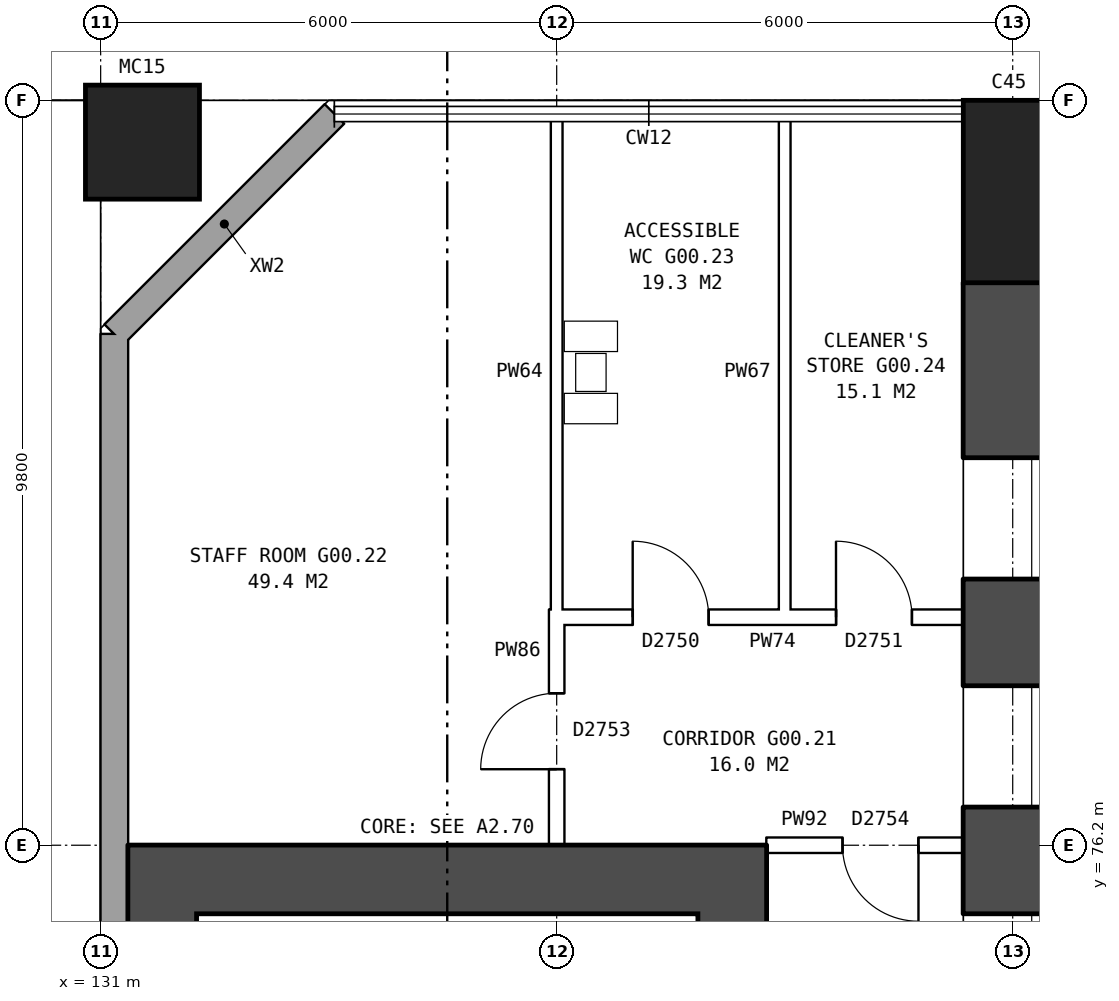
"""IFC4 building model, lengths in metres.
Left out: names, types, materials, properties, quantities, classifications, styles, units other than length and angle.
Written with IfcOpenShell. Run it as: python <this file> out.ifc"""

import sys

from ifc_helpers import new_model, si_unit, direction, frame, frame_2d, origin, origin_2d, place, context, subcontext, project, spatial, rectangle, hollow_rectangle, extrude, element, fill, save


model = new_model("IFC4")
c1 = context("Model", 3, precision=1e-05, world=origin(), true_north=direction((0.0, 1.0)))
c2 = subcontext(c1, "Body", "Model", "MODEL_VIEW")
j1 = project(units=[si_unit("LENGTHUNIT", "METRE"), si_unit("PLANEANGLEUNIT", "RADIAN")], contexts=[c1])
p1 = place(None, origin())
s1 = spatial("IfcSite", under=j1, at=p1, CompositionType="ELEMENT")
p2 = place(p1, origin())
s2 = spatial("IfcBuilding", under=s1, at=p2, CompositionType="ELEMENT")
p3 = place(p2, origin())
s3 = spatial("IfcBuildingStorey", under=s2, at=p3, CompositionType="ELEMENT", Elevation=0.0)
p4 = place(p3, frame((142.95, 84.8, -0.35), z_axis=(0.0, 0.0, 1.0), x_axis=(1.0, 0.0, 0.0)))
e1 = element("IfcColumn", 1, at=p4, inside=s3, PredefinedType="COLUMN", context=c2, shape_type="SweptSolid", body=[
    extrude(rectangle(XDim=1.2, YDim=2.4, at=origin_2d()), origin(), (0.0, 0.0, 1.0), 5.55),
])
p5 = place(p3, frame((142.95, 56.4, -0.35), z_axis=(0.0, 0.0, 1.0), x_axis=(0.0, 1.0, 0.0)))
e2 = element("IfcWall", 2, at=p5, inside=s3, PredefinedType="SHEAR", context=c2, shape_type="SweptSolid", body=[
    extrude(rectangle(XDim=27.2, YDim=1.2, at=frame_2d((13.6, 0.0))), origin(), (0.0, 0.0, 1.0), 5.55),
])
p6 = place(p5, frame((2.3, 0.0, 0.8)))
e3 = element("IfcOpeningElement", 3, at=p6, cuts=e2, PredefinedType="OPENING", context=c2, shape_type="SweptSolid", body=[
    extrude(rectangle(XDim=1.6, YDim=1.8, at=frame_2d((0.8, 0.9))), frame((0.0, 0.61, 0.0), z_axis=(0.0, -1.0, 0.0), x_axis=(1.0, 0.0, 0.0)), (0.0, 0.0, 1.0), 1.22),
])
p7 = place(p5, frame((5.3, 0.0, 0.8)))
e4 = element("IfcOpeningElement", 4, at=p7, cuts=e2, PredefinedType="OPENING", context=c2, shape_type="SweptSolid", body=[
    extrude(rectangle(XDim=1.6, YDim=1.8, at=frame_2d((0.8, 0.9))), frame((0.0, 0.61, 0.0), z_axis=(0.0, -1.0, 0.0), x_axis=(1.0, 0.0, 0.0)), (0.0, 0.0, 1.0), 1.22),
])
p8 = place(p5, frame((8.3, 0.0, 0.8)))
e5 = element("IfcOpeningElement", 5, at=p8, cuts=e2, PredefinedType="OPENING", context=c2, shape_type="SweptSolid", body=[
    extrude(rectangle(XDim=1.6, YDim=1.8, at=frame_2d((0.8, 0.9))), frame((0.0, 0.61, 0.0), z_axis=(0.0, -1.0, 0.0), x_axis=(1.0, 0.0, 0.0)), (0.0, 0.0, 1.0), 1.22),
])
p9 = place(p5, frame((11.3, 0.0, 0.8)))
e6 = element("IfcOpeningElement", 6, at=p9, cuts=e2, PredefinedType="OPENING", context=c2, shape_type="SweptSolid", body=[
    extrude(rectangle(XDim=1.6, YDim=1.8, at=frame_2d((0.8, 0.9))), frame((0.0, 0.61, 0.0), z_axis=(0.0, -1.0, 0.0), x_axis=(1.0, 0.0, 0.0)), (0.0, 0.0, 1.0), 1.22),
])
p10 = place(p5, frame((14.3, 0.0, 0.8)))
e7 = element("IfcOpeningElement", 7, at=p10, cuts=e2, PredefinedType="OPENING", context=c2, shape_type="SweptSolid", body=[
    extrude(rectangle(XDim=1.6, YDim=1.8, at=frame_2d((0.8, 0.9))), frame((0.0, 0.61, 0.0), z_axis=(0.0, -1.0, 0.0), x_axis=(1.0, 0.0, 0.0)), (0.0, 0.0, 1.0), 1.22),
])
p11 = place(p5, frame((17.3, 0.0, 0.8)))
e8 = element("IfcOpeningElement", 8, at=p11, cuts=e2, PredefinedType="OPENING", context=c2, shape_type="SweptSolid", body=[
    extrude(rectangle(XDim=1.6, YDim=1.8, at=frame_2d((0.8, 0.9))), frame((0.0, 0.61, 0.0), z_axis=(0.0, -1.0, 0.0), x_axis=(1.0, 0.0, 0.0)), (0.0, 0.0, 1.0), 1.22),
])
p12 = place(p5, frame((20.3, 0.0, 0.8)))
e9 = element("IfcOpeningElement", 9, at=p12, cuts=e2, PredefinedType="OPENING", context=c2, shape_type="SweptSolid", body=[
    extrude(rectangle(XDim=1.6, YDim=1.8, at=frame_2d((0.8, 0.9))), frame((0.0, 0.61, 0.0), z_axis=(0.0, -1.0, 0.0), x_axis=(1.0, 0.0, 0.0)), (0.0, 0.0, 1.0), 1.22),
])
p13 = place(p5, frame((23.3, 0.0, 0.8)))
e10 = element("IfcOpeningElement", 10, at=p13, cuts=e2, PredefinedType="OPENING", context=c2, shape_type="SweptSolid", body=[
    extrude(rectangle(XDim=1.6, YDim=1.8, at=frame_2d((0.8, 0.9))), frame((0.0, 0.61, 0.0), z_axis=(0.0, -1.0, 0.0), x_axis=(1.0, 0.0, 0.0)), (0.0, 0.0, 1.0), 1.22),
])
p14 = place(p3, frame((131.55, 85.45, -0.35), z_axis=(0.0, 0.0, 1.0), x_axis=(1.0, 0.0, 0.0)))
e11 = element("IfcColumn", 11, at=p14, inside=s3, PredefinedType="COLUMN", context=c2, shape_type="SweptSolid", body=[
    extrude(hollow_rectangle(XDim=1.5, YDim=1.5, WallThickness=0.08, at=origin_2d()), origin(), (0.0, 0.0, 1.0), 5.85),
])
p15 = place(p3, frame((134.075, 85.82, 0.0), z_axis=(0.0, 0.0, 1.0), x_axis=(-0.707106781187, -0.707106781187, 0.0)))
e12 = element("IfcWall", 12, at=p15, inside=s3, PredefinedType="STANDARD", context=c2, shape_type="SweptSolid", body=[
    extrude(rectangle(XDim=4.094, YDim=0.36, at=frame_2d((2.047, 0.0))), origin(), (0.0, 0.0, 1.0), 5.2),
])
p16 = place(p3, frame((131.18, 82.925, 0.0), z_axis=(0.0, 0.0, 1.0), x_axis=(0.0, -1.0, 0.0)))
e13 = element("IfcWall", 13, at=p16, inside=s3, PredefinedType="STANDARD", context=c2, shape_type="SweptSolid", body=[
    extrude(rectangle(XDim=25.851, YDim=0.36, at=frame_2d((12.925, 0.0))), origin(), (0.0, 0.0, 1.0), 5.2),
])
p17 = place(p16, frame((19.625, 0.0, 0.8)))
e14 = element("IfcOpeningElement", 14, at=p17, cuts=e13, PredefinedType="OPENING", context=c2, shape_type="SweptSolid", body=[
    extrude(rectangle(XDim=1.6, YDim=1.8, at=frame_2d((0.8, 0.9))), frame((0.0, 0.19, 0.0), z_axis=(0.0, -1.0, 0.0), x_axis=(1.0, 0.0, 0.0)), (0.0, 0.0, 1.0), 0.38),
])
p18 = place(p16, frame((8.125, 0.0, 0.0)))
e15 = element("IfcOpeningElement", 15, at=p18, cuts=e13, PredefinedType="OPENING", context=c2, shape_type="SweptSolid", body=[
    extrude(rectangle(XDim=1.1, YDim=2.1, at=frame_2d((0.55, 1.05))), frame((0.0, 0.19, 0.0), z_axis=(0.0, -1.0, 0.0), x_axis=(1.0, 0.0, 0.0)), (0.0, 0.0, 1.0), 0.38),
])
p19 = place(p3, frame((139.31, 64.7, 0.0), z_axis=(0.0, 0.0, 1.0), x_axis=(0.0, 1.0, 0.0)))
e16 = element("IfcWall", 16, at=p19, inside=s3, PredefinedType="SHEAR", context=c2, shape_type="SweptSolid", body=[
    extrude(rectangle(XDim=10.6, YDim=0.9, at=frame_2d((5.3, 0.0))), origin(), (0.0, 0.0, 1.0), 5.2),
])
p20 = place(p19, frame((0.425, 0.0, 0.0)))
e17 = element("IfcOpeningElement", 17, at=p20, cuts=e16, PredefinedType="OPENING", context=c2, shape_type="SweptSolid", body=[
    extrude(rectangle(XDim=1.1, YDim=2.1, at=frame_2d((0.55, 1.05))), frame((0.0, 0.46, 0.0), z_axis=(0.0, -1.0, 0.0), x_axis=(1.0, 0.0, 0.0)), (0.0, 0.0, 1.0), 0.92),
])
p21 = place(p19, frame((2.7, 0.0, 0.0)))
e18 = element("IfcOpeningElement", 18, at=p21, cuts=e16, PredefinedType="OPENING", context=c2, shape_type="SweptSolid", body=[
    extrude(rectangle(XDim=1.1, YDim=2.1, at=frame_2d((0.55, 1.05))), frame((0.0, 0.46, 0.0), z_axis=(0.0, -1.0, 0.0), x_axis=(1.0, 0.0, 0.0)), (0.0, 0.0, 1.0), 0.92),
])
p22 = place(p19, frame((4.9, 0.0, 0.0)))
e19 = element("IfcOpeningElement", 19, at=p22, cuts=e16, PredefinedType="OPENING", context=c2, shape_type="SweptSolid", body=[
    extrude(rectangle(XDim=1.1, YDim=2.1, at=frame_2d((0.55, 1.05))), frame((0.0, 0.46, 0.0), z_axis=(0.0, -1.0, 0.0), x_axis=(1.0, 0.0, 0.0)), (0.0, 0.0, 1.0), 0.92),
])
p23 = place(p19, frame((9.0, 0.0, 0.0)))
e20 = element("IfcOpeningElement", 20, at=p23, cuts=e16, PredefinedType="OPENING", context=c2, shape_type="SweptSolid", body=[
    extrude(rectangle(XDim=1.1, YDim=2.1, at=frame_2d((0.55, 1.05))), frame((0.0, 0.46, 0.0), z_axis=(0.0, -1.0, 0.0), x_axis=(1.0, 0.0, 0.0)), (0.0, 0.0, 1.0), 0.92),
])
p24 = place(p19, frame((7.225, 0.0, 0.0)))
e21 = element("IfcOpeningElement", 21, at=p24, cuts=e16, PredefinedType="OPENING", context=c2, shape_type="SweptSolid", body=[
    extrude(rectangle(XDim=0.85, YDim=2.1, at=frame_2d((0.425, 1.05))), frame((0.0, 0.46, 0.0), z_axis=(0.0, -1.0, 0.0), x_axis=(1.0, 0.0, 0.0)), (0.0, 0.0, 1.0), 0.92),
])
p25 = place(p3, frame((131.81, 64.7, 0.0), z_axis=(0.0, 0.0, 1.0), x_axis=(0.0, 1.0, 0.0)))
e22 = element("IfcWall", 22, at=p25, inside=s3, PredefinedType="SHEAR", context=c2, shape_type="SweptSolid", body=[
    extrude(rectangle(XDim=10.6, YDim=0.9, at=frame_2d((5.3, 0.0))), origin(), (0.0, 0.0, 1.0), 5.2),
])
p26 = place(p25, frame((9.0, 0.0, 0.0)))
e23 = element("IfcOpeningElement", 23, at=p26, cuts=e22, PredefinedType="OPENING", context=c2, shape_type="SweptSolid", body=[
    extrude(rectangle(XDim=1.1, YDim=2.1, at=frame_2d((0.55, 1.05))), frame((0.0, 0.46, 0.0), z_axis=(0.0, -1.0, 0.0), x_axis=(1.0, 0.0, 0.0)), (0.0, 0.0, 1.0), 0.92),
])
p27 = place(p3, frame((139.76, 75.75, 0.0), z_axis=(0.0, 0.0, 1.0), x_axis=(-1.0, 0.0, 0.0)))
e24 = element("IfcWall", 24, at=p27, inside=s3, PredefinedType="SHEAR", context=c2, shape_type="SweptSolid", body=[
    extrude(rectangle(XDim=8.4, YDim=0.9, at=frame_2d((4.2, 0.0))), origin(), (0.0, 0.0, 1.0), 5.2),
])
p28 = place(p3, frame((139.76, 76.2, 0.0), z_axis=(0.0, 0.0, 1.0), x_axis=(1.0, 0.0, 0.0)))
e25 = element("IfcWall", 25, at=p28, inside=s3, PredefinedType="PARTITIONING", context=c2, shape_type="SweptSolid", body=[
    extrude(rectangle(XDim=2.59, YDim=0.2, at=frame_2d((1.295, 0.0))), origin(), (0.0, 0.0, 1.0), 5.2),
])
p29 = place(p28, frame((1.0, 0.0, 0.0)))
e26 = element("IfcOpeningElement", 26, at=p29, cuts=e25, PredefinedType="OPENING", context=c2, shape_type="SweptSolid", body=[
    extrude(rectangle(XDim=1.0, YDim=2.1, at=frame_2d((0.5, 1.05))), frame((0.0, 0.11, 0.0), z_axis=(0.0, -1.0, 0.0), x_axis=(1.0, 0.0, 0.0)), (0.0, 0.0, 1.0), 0.22),
])
p30 = place(p3, frame((136.9, 79.2, 0.0), z_axis=(0.0, 0.0, 1.0), x_axis=(1.0, 0.0, 0.0)))
e27 = element("IfcWall", 27, at=p30, inside=s3, PredefinedType="PARTITIONING", context=c2, shape_type="SweptSolid", body=[
    extrude(rectangle(XDim=5.57, YDim=0.2, at=frame_2d((2.785, 0.0))), origin(), (0.0, 0.0, 1.0), 5.2),
])
p31 = place(p30, frame((1.1, 0.0, 0.0)))
e28 = element("IfcOpeningElement", 28, at=p31, cuts=e27, PredefinedType="OPENING", context=c2, shape_type="SweptSolid", body=[
    extrude(rectangle(XDim=1.0, YDim=2.1, at=frame_2d((0.5, 1.05))), frame((0.0, 0.11, 0.0), z_axis=(0.0, -1.0, 0.0), x_axis=(1.0, 0.0, 0.0)), (0.0, 0.0, 1.0), 0.22),
])
p32 = place(p30, frame((3.775, 0.0, 0.0)))
e29 = element("IfcOpeningElement", 29, at=p32, cuts=e27, PredefinedType="OPENING", context=c2, shape_type="SweptSolid", body=[
    extrude(rectangle(XDim=1.0, YDim=2.1, at=frame_2d((0.5, 1.05))), frame((0.0, 0.11, 0.0), z_axis=(0.0, -1.0, 0.0), x_axis=(1.0, 0.0, 0.0)), (0.0, 0.0, 1.0), 0.22),
])
p33 = place(p3, frame((137.0, 76.2, 0.0), z_axis=(0.0, 0.0, 1.0), x_axis=(0.0, 1.0, 0.0)))
e30 = element("IfcWall", 30, at=p33, inside=s3, PredefinedType="PARTITIONING", context=c2, shape_type="SweptSolid", body=[
    extrude(rectangle(XDim=3.1, YDim=0.2, at=frame_2d((1.55, 0.0))), origin(), (0.0, 0.0, 1.0), 5.2),
])
p34 = place(p33, frame((1.0, 0.0, 0.0)))
e31 = element("IfcOpeningElement", 31, at=p34, cuts=e30, PredefinedType="OPENING", context=c2, shape_type="SweptSolid", body=[
    extrude(rectangle(XDim=1.0, YDim=2.1, at=frame_2d((0.5, 1.05))), frame((0.0, 0.11, 0.0), z_axis=(0.0, -1.0, 0.0), x_axis=(1.0, 0.0, 0.0)), (0.0, 0.0, 1.0), 0.22),
])
for number, where, z_axis, x_axis in (
    (32, (137.0, 79.1, 0.0), (0.0, 0.0, 1.0), (0.0, 1.0, 0.0)),
    (33, (140.0, 79.1, 0.0), (0.0, 0.0, 1.0), (0.0, 1.0, 0.0)),
):
    element("IfcWall", number, at=place(p3, frame(where, z_axis=z_axis, x_axis=x_axis)), inside=s3, PredefinedType="PLUMBINGWALL", context=c2, shape_type="SweptSolid", body=[
        extrude(rectangle(XDim=6.66, YDim=0.15, at=frame_2d((3.33, 0.0))), origin(), (0.0, 0.0, 1.0), 5.2),
    ])
p35 = place(p11, origin())
e34 = element("IfcWindow", 34, at=p35, inside=s3, PartitioningType="SINGLE_PANEL", PredefinedType="WINDOW", context=c2, shape_type="SweptSolid", body=[
    extrude(rectangle(XDim=1.6, YDim=1.8, at=frame_2d((0.8, 0.9))), frame((0.0, -0.27, 0.0), z_axis=(0.0, -1.0, 0.0), x_axis=(1.0, 0.0, 0.0)), (0.0, 0.0, 1.0), 0.06),
])
fill(e8, e34)
p36 = place(p12, origin())
e35 = element("IfcWindow", 35, at=p36, inside=s3, PartitioningType="SINGLE_PANEL", PredefinedType="WINDOW", context=c2, shape_type="SweptSolid", body=[
    extrude(rectangle(XDim=1.6, YDim=1.8, at=frame_2d((0.8, 0.9))), frame((0.0, -0.27, 0.0), z_axis=(0.0, -1.0, 0.0), x_axis=(1.0, 0.0, 0.0)), (0.0, 0.0, 1.0), 0.06),
])
fill(e9, e35)
p37 = place(p13, origin())
e36 = element("IfcWindow", 36, at=p37, inside=s3, PartitioningType="SINGLE_PANEL", PredefinedType="WINDOW", context=c2, shape_type="SweptSolid", body=[
    extrude(rectangle(XDim=1.6, YDim=1.8, at=frame_2d((0.8, 0.9))), frame((0.0, -0.27, 0.0), z_axis=(0.0, -1.0, 0.0), x_axis=(1.0, 0.0, 0.0)), (0.0, 0.0, 1.0), 0.06),
])
fill(e10, e36)
p38 = place(p29, frame((1.0, 0.0, 0.0), z_axis=(0.0, 0.0, 1.0), x_axis=(-1.0, 0.0, 0.0)))
e37 = element("IfcDoor", 37, at=p38, inside=s3, OperationType="SINGLE_SWING_LEFT", PredefinedType="DOOR", context=c2, shape_type="SweptSolid", body=[
    extrude(rectangle(XDim=1.0, YDim=2.1, at=frame_2d((0.5, 1.05))), frame((0.0, 0.025, 0.0), z_axis=(0.0, -1.0, 0.0), x_axis=(1.0, 0.0, 0.0)), (0.0, 0.0, 1.0), 0.05),
])
fill(e26, e37)
p39 = place(p31, origin())
e38 = element("IfcDoor", 38, at=p39, inside=s3, OperationType="SINGLE_SWING_LEFT", PredefinedType="DOOR", context=c2, shape_type="SweptSolid", body=[
    extrude(rectangle(XDim=1.0, YDim=2.1, at=frame_2d((0.5, 1.05))), frame((0.0, 0.025, 0.0), z_axis=(0.0, -1.0, 0.0), x_axis=(1.0, 0.0, 0.0)), (0.0, 0.0, 1.0), 0.05),
])
fill(e28, e38)
p40 = place(p32, origin())
e39 = element("IfcDoor", 39, at=p40, inside=s3, OperationType="SINGLE_SWING_LEFT", PredefinedType="DOOR", context=c2, shape_type="SweptSolid", body=[
    extrude(rectangle(XDim=1.0, YDim=2.1, at=frame_2d((0.5, 1.05))), frame((0.0, 0.025, 0.0), z_axis=(0.0, -1.0, 0.0), x_axis=(1.0, 0.0, 0.0)), (0.0, 0.0, 1.0), 0.05),
])
fill(e29, e39)
p41 = place(p34, origin())
e40 = element("IfcDoor", 40, at=p41, inside=s3, OperationType="SINGLE_SWING_LEFT", PredefinedType="DOOR", context=c2, shape_type="SweptSolid", body=[
    extrude(rectangle(XDim=1.0, YDim=2.1, at=frame_2d((0.5, 1.05))), frame((0.0, 0.025, 0.0), z_axis=(0.0, -1.0, 0.0), x_axis=(1.0, 0.0, 0.0)), (0.0, 0.0, 1.0), 0.05),
])
fill(e31, e40)
save(model, sys.argv[1])
